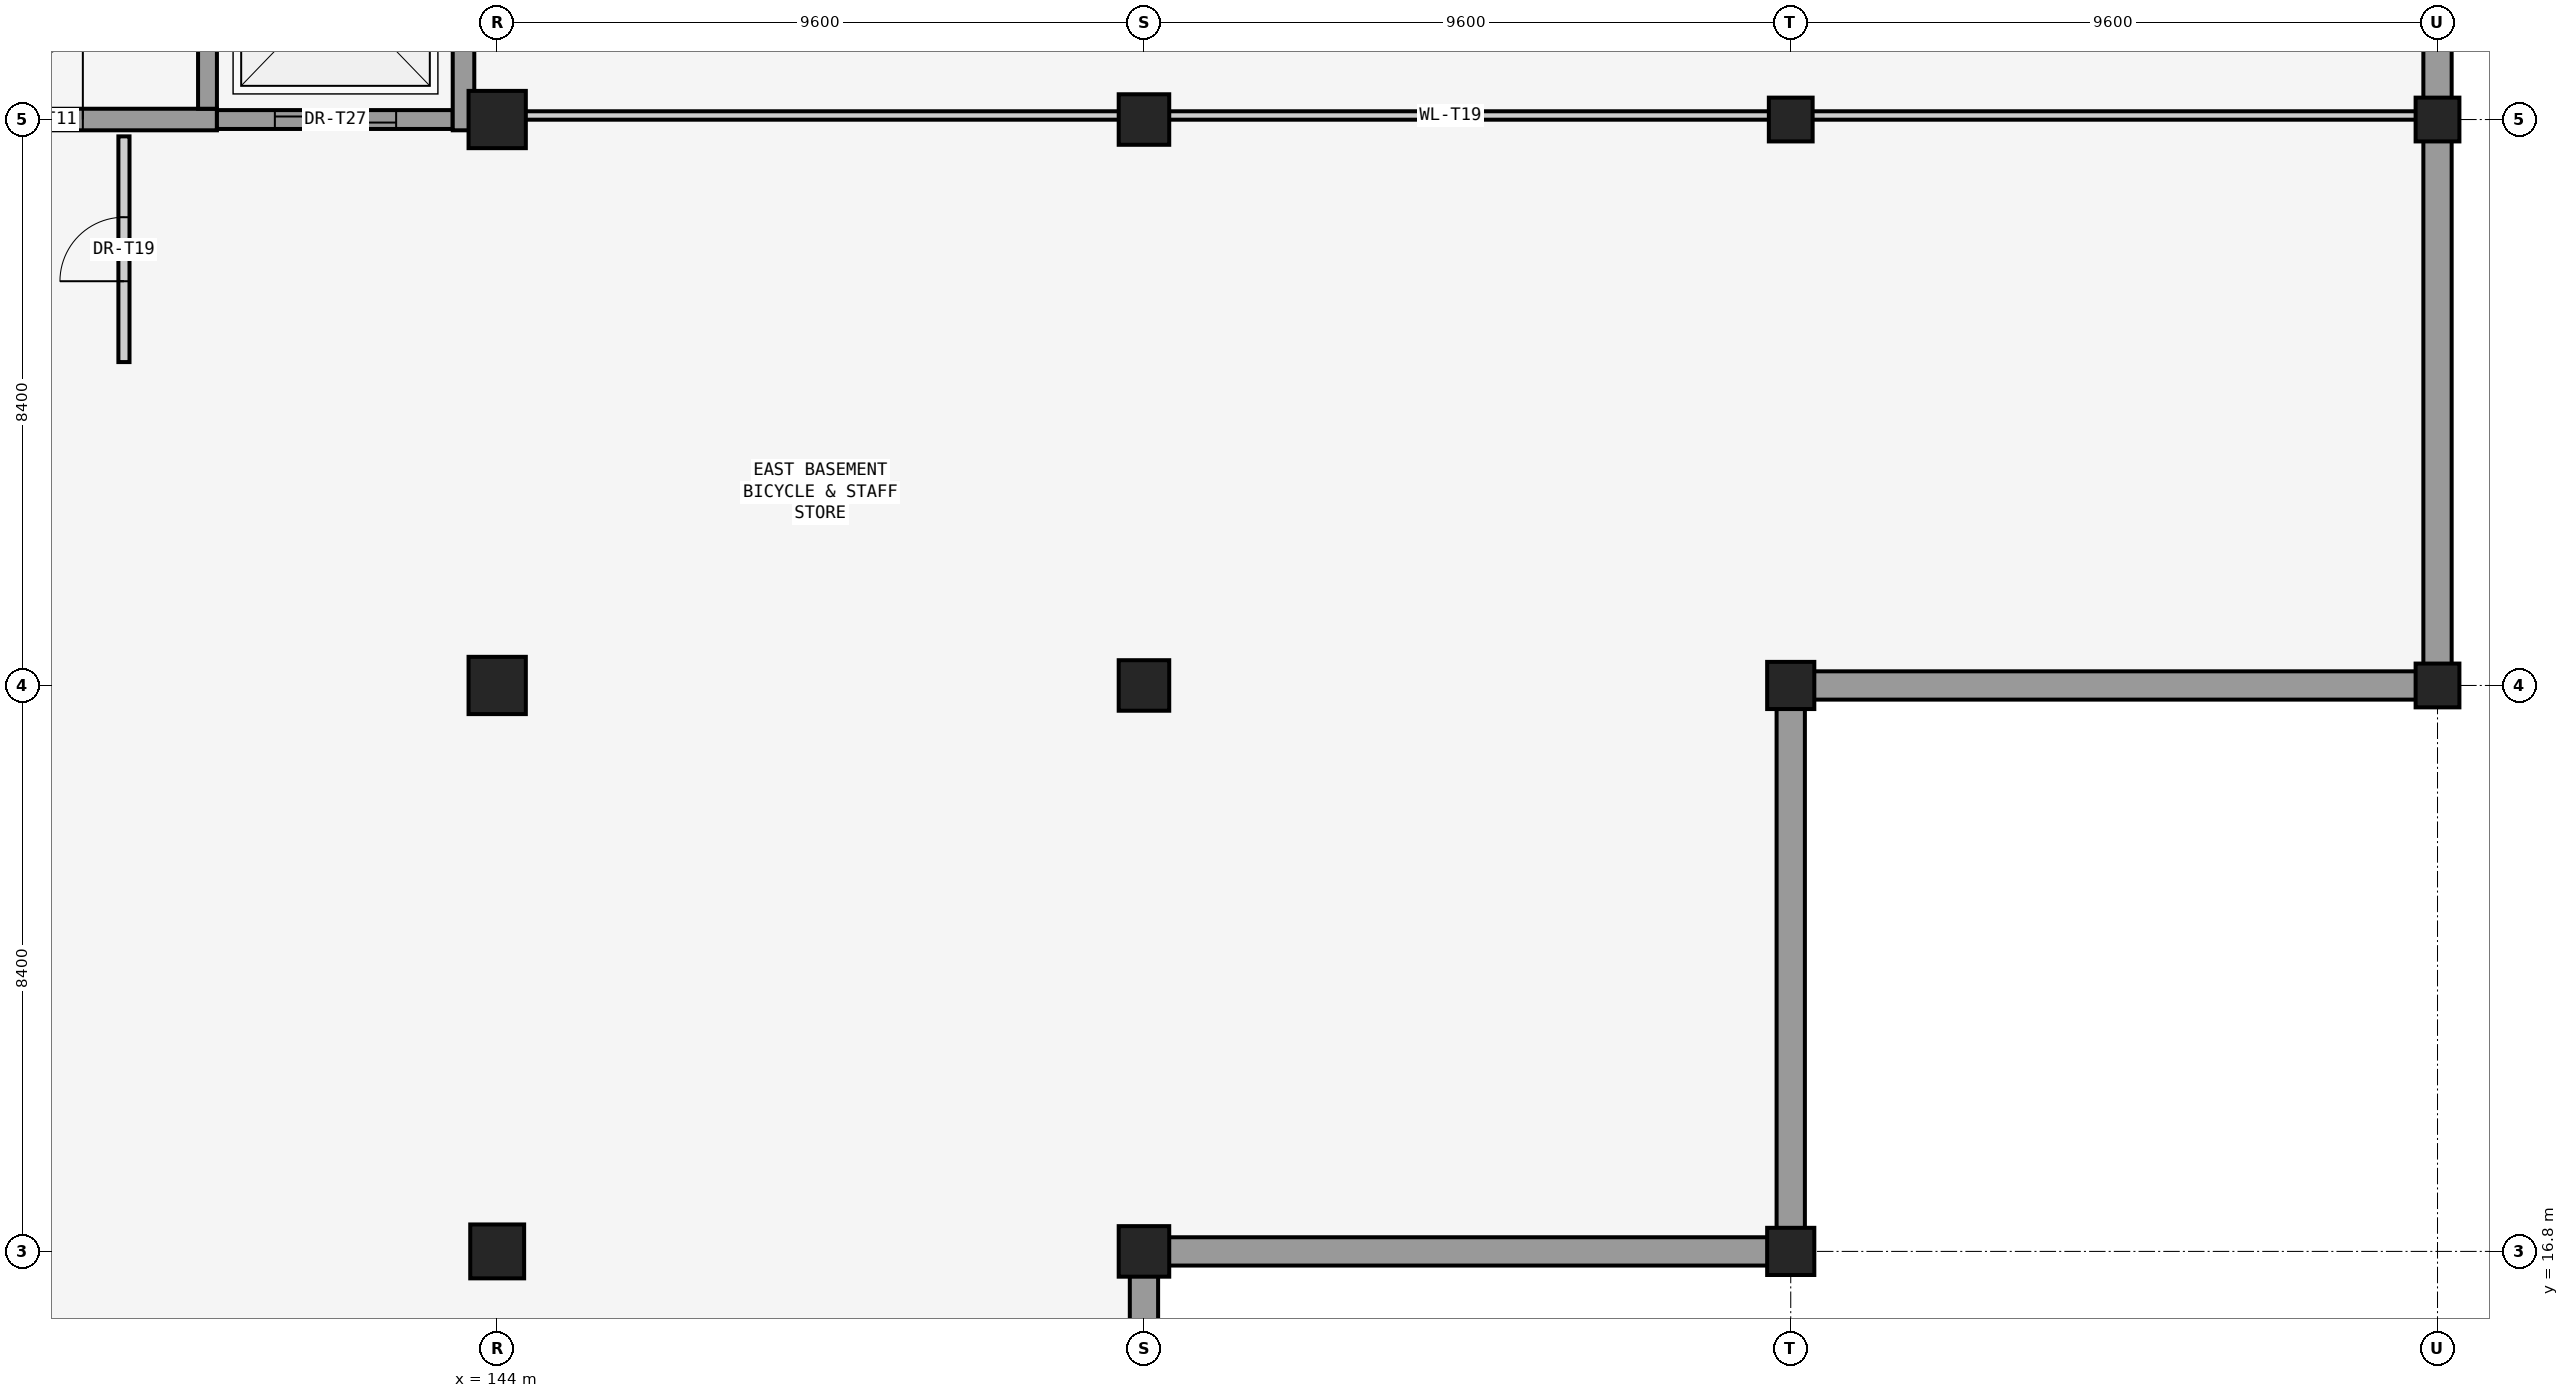
"""IFC4 building model, lengths in metres.
Left out: names, types, materials, properties, quantities, classifications, styles, units other than length and angle.
Written with IfcOpenShell. Run it as: python <this file> out.ifc"""

import sys

from ifc_helpers import new_model, si_unit, direction, frame, frame_2d, origin, origin_2d, place, context, subcontext, project, spatial, rectangle, extrude, element, fill, save


model = new_model("IFC4")
c1 = context("Model", 3, precision=1e-05, world=origin(), true_north=direction((0.0, 1.0)))
c2 = subcontext(c1, "Body", "Model", "MODEL_VIEW")
j1 = project(units=[si_unit("LENGTHUNIT", "METRE"), si_unit("PLANEANGLEUNIT", "RADIAN")], contexts=[c1])
p1 = place(None, origin())
s1 = spatial("IfcSite", under=j1, at=p1, CompositionType="ELEMENT")
p2 = place(p1, origin())
s2 = spatial("IfcBuilding", under=s1, at=p2, CompositionType="ELEMENT")
p3 = place(p2, frame((0.0, 0.0, -9.6)))
s3 = spatial("IfcBuildingStorey", under=s2, at=p3, CompositionType="ELEMENT", Elevation=-9.6)
p4 = place(p3, frame((144.0, 16.8, 0.0), z_axis=(0.0, 0.0, 1.0), x_axis=(1.0, 0.0, 0.0)))
e1 = element("IfcColumn", 1, at=p4, inside=s3, PredefinedType="COLUMN", context=c2, shape_type="SweptSolid", body=[
    extrude(rectangle(XDim=0.8, YDim=0.8, at=origin_2d()), origin(), (0.0, 0.0, 1.0), 4.4),
])
for number, where, z_axis, x_axis in (
    (2, (144.0, 25.2, 0.0), (0.0, 0.0, 1.0), (1.0, 0.0, 0.0)),
    (3, (144.0, 33.6, 0.0), (0.0, 0.0, 1.0), (1.0, 0.0, 0.0)),
):
    element("IfcColumn", number, at=place(p3, frame(where, z_axis=z_axis, x_axis=x_axis)), inside=s3, PredefinedType="COLUMN", context=c2, shape_type="SweptSolid", body=[
        extrude(rectangle(XDim=0.85, YDim=0.85, at=origin_2d()), origin(), (0.0, 0.0, 1.0), 4.4),
    ])
for number, where, z_axis, x_axis in (
    (4, (153.6, 16.8, 0.0), (0.0, 0.0, 1.0), (1.0, 0.0, 0.0)),
    (5, (153.6, 25.2, 0.0), (0.0, 0.0, 1.0), (1.0, 0.0, 0.0)),
    (6, (153.6, 33.6, 0.0), (0.0, 0.0, 1.0), (1.0, 0.0, 0.0)),
):
    element("IfcColumn", number, at=place(p3, frame(where, z_axis=z_axis, x_axis=x_axis)), inside=s3, PredefinedType="COLUMN", context=c2, shape_type="SweptSolid", body=[
        extrude(rectangle(XDim=0.75, YDim=0.75, at=origin_2d()), origin(), (0.0, 0.0, 1.0), 4.4),
    ])
for number, where, z_axis, x_axis in (
    (7, (163.2, 16.8, 0.0), (0.0, 0.0, 1.0), (1.0, 0.0, 0.0)),
    (8, (163.2, 25.2, 0.0), (0.0, 0.0, 1.0), (1.0, 0.0, 0.0)),
):
    element("IfcColumn", number, at=place(p3, frame(where, z_axis=z_axis, x_axis=x_axis)), inside=s3, PredefinedType="COLUMN", context=c2, shape_type="SweptSolid", body=[
        extrude(rectangle(XDim=0.7, YDim=0.7, at=origin_2d()), origin(), (0.0, 0.0, 1.0), 4.4),
    ])
p5 = place(p3, frame((163.2, 33.6, 0.0), z_axis=(0.0, 0.0, 1.0), x_axis=(1.0, 0.0, 0.0)))
e9 = element("IfcColumn", 9, at=p5, inside=s3, PredefinedType="COLUMN", context=c2, shape_type="SweptSolid", body=[
    extrude(rectangle(XDim=0.65, YDim=0.65, at=origin_2d()), origin(), (0.0, 0.0, 1.0), 4.4),
])
for number, where, z_axis, x_axis in (
    (10, (172.8, 25.2, 0.0), (0.0, 0.0, 1.0), (1.0, 0.0, 0.0)),
    (11, (172.8, 33.6, 0.0), (0.0, 0.0, 1.0), (1.0, 0.0, 0.0)),
):
    element("IfcColumn", number, at=place(p3, frame(where, z_axis=z_axis, x_axis=x_axis)), inside=s3, PredefinedType="COLUMN", context=c2, shape_type="SweptSolid", body=[
        extrude(rectangle(XDim=0.65, YDim=0.65, at=origin_2d()), origin(), (0.0, 0.0, 1.0), 4.57),
    ])
p6 = place(p3, frame((153.6, 16.8, 0.0), z_axis=(0.0, 0.0, 1.0), x_axis=(0.0, -1.0, 0.0)))
e12 = element("IfcWall", 12, at=p6, inside=s3, PredefinedType="USERDEFINED", context=c2, shape_type="SweptSolid", body=[
    extrude(rectangle(XDim=8.4, YDim=0.42, at=frame_2d((4.2, 0.0))), origin(), (0.0, 0.0, 1.0), 4.38),
])
p7 = place(p3, frame((163.2, 16.8, 0.0), z_axis=(0.0, 0.0, 1.0), x_axis=(-1.0, 0.0, 0.0)))
e13 = element("IfcWall", 13, at=p7, inside=s3, PredefinedType="USERDEFINED", context=c2, shape_type="SweptSolid", body=[
    extrude(rectangle(XDim=9.6, YDim=0.42, at=frame_2d((4.8, 0.0))), origin(), (0.0, 0.0, 1.0), 4.38),
])
p8 = place(p3, frame((163.2, 25.2, 0.0), z_axis=(0.0, 0.0, 1.0), x_axis=(0.0, -1.0, 0.0)))
e14 = element("IfcWall", 14, at=p8, inside=s3, PredefinedType="USERDEFINED", context=c2, shape_type="SweptSolid", body=[
    extrude(rectangle(XDim=8.4, YDim=0.42, at=frame_2d((4.2, 0.0))), origin(), (0.0, 0.0, 1.0), 4.38),
])
p9 = place(p3, frame((172.8, 25.2, 0.0), z_axis=(0.0, 0.0, 1.0), x_axis=(-1.0, 0.0, 0.0)))
e15 = element("IfcWall", 15, at=p9, inside=s3, PredefinedType="USERDEFINED", context=c2, shape_type="SweptSolid", body=[
    extrude(rectangle(XDim=9.6, YDim=0.42, at=frame_2d((4.8, 0.0))), origin(), (0.0, 0.0, 1.0), 4.55),
])
p10 = place(p3, frame((172.8, 33.6, 0.0), z_axis=(0.0, 0.0, 1.0), x_axis=(0.0, -1.0, 0.0)))
e16 = element("IfcWall", 16, at=p10, inside=s3, PredefinedType="USERDEFINED", context=c2, shape_type="SweptSolid", body=[
    extrude(rectangle(XDim=8.4, YDim=0.42, at=frame_2d((4.2, 0.0))), origin(), (0.0, 0.0, 1.0), 4.55),
])
p11 = place(p3, frame((172.8, 42.0, 0.0), z_axis=(0.0, 0.0, 1.0), x_axis=(0.0, -1.0, 0.0)))
e17 = element("IfcWall", 17, at=p11, inside=s3, PredefinedType="USERDEFINED", context=c2, shape_type="SweptSolid", body=[
    extrude(rectangle(XDim=8.4, YDim=0.42, at=frame_2d((4.2, 0.0))), origin(), (0.0, 0.0, 1.0), 4.55),
])
p12 = place(p3, frame((135.06, 33.6, 0.0), z_axis=(0.0, 0.0, 1.0), x_axis=(1.0, 0.0, 0.0)))
e18 = element("IfcWall", 18, at=p12, inside=s3, PredefinedType="SHEAR", context=c2, shape_type="SweptSolid", body=[
    extrude(rectangle(XDim=4.78, YDim=0.32, at=frame_2d((2.39, 0.0))), origin(), (0.0, 0.0, 1.0), 4.38),
])
p13 = place(p12, frame((1.69, 0.0, 0.0)))
e19 = element("IfcOpeningElement", 19, at=p13, cuts=e18, PredefinedType="OPENING", context=c2, shape_type="SweptSolid", body=[
    extrude(rectangle(XDim=1.1, YDim=2.2, at=frame_2d((0.55, 1.1))), frame((0.0, 0.17, 0.0), z_axis=(0.0, -1.0, 0.0), x_axis=(1.0, 0.0, 0.0)), (0.0, 0.0, 1.0), 0.34),
])
p14 = place(p3, frame((139.84, 33.6, 0.0), z_axis=(0.0, 0.0, 1.0), x_axis=(1.0, 0.0, 0.0)))
e20 = element("IfcWall", 20, at=p14, inside=s3, PredefinedType="SHEAR", context=c2, shape_type="SweptSolid", body=[
    extrude(rectangle(XDim=3.5, YDim=0.28, at=frame_2d((1.75, 0.0))), origin(), (0.0, 0.0, 1.0), 4.38),
])
p15 = place(p14, frame((0.86, 0.0, 0.0)))
e21 = element("IfcOpeningElement", 21, at=p15, cuts=e20, PredefinedType="OPENING", context=c2, shape_type="SweptSolid", body=[
    extrude(rectangle(XDim=1.8, YDim=2.4, at=frame_2d((0.9, 1.2))), frame((0.0, 0.15, 0.0), z_axis=(0.0, -1.0, 0.0), x_axis=(1.0, 0.0, 0.0)), (0.0, 0.0, 1.0), 0.3),
])
p16 = place(p3, frame((143.5, 33.44, 0.0), z_axis=(0.0, 0.0, 1.0), x_axis=(0.0, 1.0, 0.0)))
e22 = element("IfcWall", 22, at=p16, inside=s3, PredefinedType="SHEAR", context=c2, shape_type="SweptSolid", body=[
    extrude(rectangle(XDim=8.36, YDim=0.32, at=frame_2d((4.18, 0.0))), origin(), (0.0, 0.0, 1.0), 4.38),
])
p17 = place(p3, frame((139.7, 33.76, 0.0), z_axis=(0.0, 0.0, 1.0), x_axis=(0.0, 1.0, 0.0)))
e23 = element("IfcWall", 23, at=p17, inside=s3, PredefinedType="SHEAR", context=c2, shape_type="SweptSolid", body=[
    extrude(rectangle(XDim=7.72, YDim=0.28, at=frame_2d((3.86, 0.0))), origin(), (0.0, 0.0, 1.0), 4.38),
])
p18 = place(p3, frame((138.46, 30.0, 0.0), z_axis=(0.0, 0.0, 1.0), x_axis=(0.0, 1.0, 0.0)))
e24 = element("IfcWall", 24, at=p18, inside=s3, PredefinedType="PARTITIONING", context=c2, shape_type="SweptSolid", body=[
    extrude(rectangle(XDim=3.35, YDim=0.165, at=frame_2d((1.675, 0.0))), origin(), (0.0, 0.0, 1.0), 4.35),
])
p19 = place(p18, frame((1.2, 0.0, 0.0)))
e25 = element("IfcOpeningElement", 25, at=p19, cuts=e24, PredefinedType="OPENING", context=c2, shape_type="SweptSolid", body=[
    extrude(rectangle(XDim=0.95, YDim=2.15, at=frame_2d((0.475, 1.075))), frame((0.0, 0.093, 0.0), z_axis=(0.0, -1.0, 0.0), x_axis=(1.0, 0.0, 0.0)), (0.0, 0.0, 1.0), 0.185),
])
p20 = place(p3, frame((143.75, 33.66, 0.0), z_axis=(0.0, 0.0, 1.0), x_axis=(1.0, 0.0, 0.0)))
e26 = element("IfcWall", 26, at=p20, inside=s3, PredefinedType="PARTITIONING", context=c2, shape_type="SweptSolid", body=[
    extrude(rectangle(XDim=28.8, YDim=0.125, at=frame_2d((14.4, 0.0))), origin(), (0.0, 0.0, 1.0), 3.28),
])
p21 = place(p13, origin())
e27 = element("IfcDoor", 27, at=p21, inside=s3, OperationType="SINGLE_SWING_RIGHT", PredefinedType="DOOR", context=c2, shape_type="SweptSolid", body=[
    extrude(rectangle(XDim=1.1, YDim=2.2, at=frame_2d((0.55, 1.1))), frame((0.0, 0.025, 0.0), z_axis=(0.0, -1.0, 0.0), x_axis=(1.0, 0.0, 0.0)), (0.0, 0.0, 1.0), 0.05),
])
fill(e19, e27)
p22 = place(p15, origin())
e28 = element("IfcDoor", 28, at=p22, inside=s3, OperationType="SLIDING_TO_LEFT", PredefinedType="DOOR", context=c2, shape_type="SweptSolid", body=[
    extrude(rectangle(XDim=1.8, YDim=2.4, at=frame_2d((0.9, 1.2))), frame((0.0, 0.025, 0.0), z_axis=(0.0, -1.0, 0.0), x_axis=(1.0, 0.0, 0.0)), (0.0, 0.0, 1.0), 0.05),
])
fill(e21, e28)
p23 = place(p19, origin())
e29 = element("IfcDoor", 29, at=p23, inside=s3, OperationType="SINGLE_SWING_LEFT", PredefinedType="DOOR", context=c2, shape_type="SweptSolid", body=[
    extrude(rectangle(XDim=0.95, YDim=2.15, at=frame_2d((0.475, 1.075))), frame((0.0, 0.025, 0.0), z_axis=(0.0, -1.0, 0.0), x_axis=(1.0, 0.0, 0.0)), (0.0, 0.0, 1.0), 0.05),
])
fill(e25, e29)
save(model, sys.argv[1])
